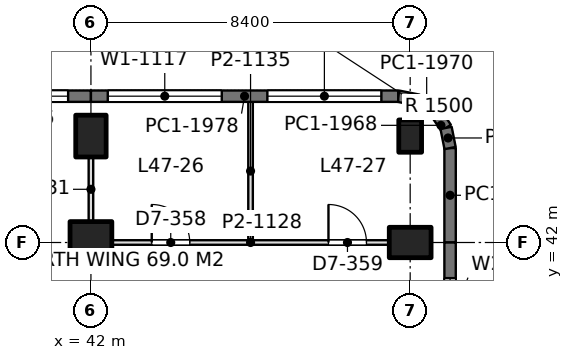
"""IFC4 building model, lengths in metres.
Left out: names, types, materials, properties, quantities, classifications, styles, units other than length and angle.
Written with IfcOpenShell. Run it as: python <this file> out.ifc"""

import sys

from ifc_helpers import new_model, si_unit, direction, frame, frame_2d, origin, origin_2d, place, context, subcontext, project, spatial, rectangle, extrude, element, fill, save


model = new_model("IFC4")
c1 = context("Model", 3, precision=1e-05, world=origin(), true_north=direction((0.0, 1.0)))
c2 = subcontext(c1, "Body", "Model", "MODEL_VIEW")
j1 = project(units=[si_unit("LENGTHUNIT", "METRE"), si_unit("PLANEANGLEUNIT", "RADIAN")], contexts=[c1])
p1 = place(None, origin())
s1 = spatial("IfcSite", under=j1, at=p1, CompositionType="ELEMENT")
p2 = place(p1, origin())
s2 = spatial("IfcBuilding", under=s1, at=p2, CompositionType="ELEMENT")
p3 = place(p2, frame((0.0, 0.0, 207.0)))
s3 = spatial("IfcBuildingStorey", under=s2, at=p3, CompositionType="ELEMENT", Elevation=207.0)
p4 = place(p3, frame((42.0, 42.0, 0.0), z_axis=(0.0, 0.0, 1.0), x_axis=(1.0, 0.0, 0.0)))
e1 = element("IfcColumn", 1, at=p4, inside=s3, PredefinedType="COLUMN", context=c2, shape_type="SweptSolid", body=[
    extrude(rectangle(XDim=1.1, YDim=1.1, at=origin_2d()), origin(), (0.0, 0.0, 1.0), 4.2),
])
for number, where, z_axis, x_axis in (
    (2, (42.0, 44.8, 0.0), (0.0, 0.0, 1.0), (1.0, 0.0, 0.0)),
    (3, (50.4, 42.0, 0.0), (0.0, 0.0, 1.0), (0.0, 1.0, 0.0)),
):
    element("IfcColumn", number, at=place(p3, frame(where, z_axis=z_axis, x_axis=x_axis)), inside=s3, PredefinedType="COLUMN", context=c2, shape_type="SweptSolid", body=[
        extrude(rectangle(XDim=0.8, YDim=1.1, at=origin_2d()), origin(), (0.0, 0.0, 1.0), 4.2),
    ])
p5 = place(p3, frame((50.4, 44.8, 0.0), z_axis=(0.0, 0.0, 1.0), x_axis=(1.0, 0.0, 0.0)))
e4 = element("IfcColumn", 4, at=p5, inside=s3, PredefinedType="COLUMN", context=c2, shape_type="SweptSolid", body=[
    extrude(rectangle(XDim=0.6, YDim=0.85, at=origin_2d()), origin(), (0.0, 0.0, 1.0), 4.2),
])
p6 = place(p3, frame((33.6, 45.85, 0.0), z_axis=(0.0, 0.0, 1.0), x_axis=(1.0, 0.0, 0.0)))
e5 = element("IfcWall", 5, at=p6, inside=s3, PredefinedType="SOLIDWALL", context=c2, shape_type="SweptSolid", body=[
    extrude(rectangle(XDim=8.4, YDim=0.3, at=frame_2d((4.2, 0.0))), origin(), (0.0, 0.0, 1.0), 4.05),
])
p7 = place(p6, frame((0.6, 0.0, 0.9)))
e6 = element("IfcOpeningElement", 6, at=p7, cuts=e5, PredefinedType="OPENING", context=c2, shape_type="SweptSolid", body=[
    extrude(rectangle(XDim=3.0, YDim=1.9, at=frame_2d((1.5, 0.95))), frame((0.0, 0.16, 0.0), z_axis=(0.0, -1.0, 0.0), x_axis=(1.0, 0.0, 0.0)), (0.0, 0.0, 1.0), 0.32),
])
p8 = place(p6, frame((4.8, 0.0, 0.9)))
e7 = element("IfcOpeningElement", 7, at=p8, cuts=e5, PredefinedType="OPENING", context=c2, shape_type="SweptSolid", body=[
    extrude(rectangle(XDim=3.0, YDim=1.9, at=frame_2d((1.5, 0.95))), frame((0.0, 0.16, 0.0), z_axis=(0.0, -1.0, 0.0), x_axis=(1.0, 0.0, 0.0)), (0.0, 0.0, 1.0), 0.32),
])
p9 = place(p3, frame((42.0, 45.85, 0.0), z_axis=(0.0, 0.0, 1.0), x_axis=(1.0, 0.0, 0.0)))
e8 = element("IfcWall", 8, at=p9, inside=s3, PredefinedType="SOLIDWALL", context=c2, shape_type="SweptSolid", body=[
    extrude(rectangle(XDim=8.085, YDim=0.3, at=frame_2d((4.042, 0.0))), origin(), (0.0, 0.0, 1.0), 4.05),
])
p10 = place(p9, frame((0.443, 0.0, 0.9)))
e9 = element("IfcOpeningElement", 9, at=p10, cuts=e8, PredefinedType="OPENING", context=c2, shape_type="SweptSolid", body=[
    extrude(rectangle(XDim=3.0, YDim=1.9, at=frame_2d((1.5, 0.95))), frame((0.0, 0.16, 0.0), z_axis=(0.0, -1.0, 0.0), x_axis=(1.0, 0.0, 0.0)), (0.0, 0.0, 1.0), 0.32),
])
p11 = place(p9, frame((4.643, 0.0, 0.9)))
e10 = element("IfcOpeningElement", 10, at=p11, cuts=e8, PredefinedType="OPENING", context=c2, shape_type="SweptSolid", body=[
    extrude(rectangle(XDim=3.0, YDim=1.9, at=frame_2d((1.5, 0.95))), frame((0.0, 0.16, 0.0), z_axis=(0.0, -1.0, 0.0), x_axis=(1.0, 0.0, 0.0)), (0.0, 0.0, 1.0), 0.32),
])
p12 = place(p3, frame((50.085, 45.85, 0.0), z_axis=(0.0, 0.0, 1.0), x_axis=(0.980702050465, -0.1955082817, 0.0)))
e11 = element("IfcWall", 11, at=p12, inside=s3, PredefinedType="SOLIDWALL", context=c2, shape_type="SweptSolid", body=[
    extrude(rectangle(XDim=0.541, YDim=0.3, at=frame_2d((0.271, 0.0))), origin(), (0.0, 0.0, 1.0), 4.05),
])
p13 = place(p3, frame((50.615, 45.744, 0.0), z_axis=(0.0, 0.0, 1.0), x_axis=(0.831692711774, -0.555236195849, 0.0)))
e12 = element("IfcWall", 12, at=p13, inside=s3, PredefinedType="SOLIDWALL", context=c2, shape_type="SweptSolid", body=[
    extrude(rectangle(XDim=0.525, YDim=0.3, at=frame_2d((0.263, 0.0))), origin(), (0.0, 0.0, 1.0), 4.05),
])
p14 = place(p3, frame((51.052, 45.453, 0.0), z_axis=(0.0, 0.0, 1.0), x_axis=(0.55534295404, -0.831621430339, 0.0)))
e13 = element("IfcWall", 13, at=p14, inside=s3, PredefinedType="SOLIDWALL", context=c2, shape_type="SweptSolid", body=[
    extrude(rectangle(XDim=0.526, YDim=0.3, at=frame_2d((0.263, 0.0))), origin(), (0.0, 0.0, 1.0), 4.05),
])
p15 = place(p3, frame((51.344, 45.015, 0.0), z_axis=(0.0, 0.0, 1.0), x_axis=(0.195073962632, -0.980788534345, 0.0)))
e14 = element("IfcWall", 14, at=p15, inside=s3, PredefinedType="SOLIDWALL", context=c2, shape_type="SweptSolid", body=[
    extrude(rectangle(XDim=0.541, YDim=0.3, at=frame_2d((0.271, 0.0))), origin(), (0.0, 0.0, 1.0), 4.05),
])
p16 = place(p3, frame((51.45, 44.485, 0.0), z_axis=(0.0, 0.0, 1.0), x_axis=(0.0, -1.0, 0.0)))
e15 = element("IfcWall", 15, at=p16, inside=s3, PredefinedType="SOLIDWALL", context=c2, shape_type="SweptSolid", body=[
    extrude(rectangle(XDim=2.485, YDim=0.3, at=frame_2d((1.243, 0.0))), origin(), (0.0, 0.0, 1.0), 4.05),
])
p17 = place(p3, frame((51.45, 42.0, 0.0), z_axis=(0.0, 0.0, 1.0), x_axis=(0.0, -1.0, 0.0)))
e16 = element("IfcWall", 16, at=p17, inside=s3, PredefinedType="SOLIDWALL", context=c2, shape_type="SweptSolid", body=[
    extrude(rectangle(XDim=4.275, YDim=0.3, at=frame_2d((2.137, 0.0))), origin(), (0.0, 0.0, 1.0), 4.05),
])
p18 = place(p17, frame((0.938, 0.0, 0.9)))
e17 = element("IfcOpeningElement", 17, at=p18, cuts=e16, PredefinedType="OPENING", context=c2, shape_type="SweptSolid", body=[
    extrude(rectangle(XDim=2.4, YDim=1.9, at=frame_2d((1.2, 0.95))), frame((0.0, 0.16, 0.0), z_axis=(0.0, -1.0, 0.0), x_axis=(1.0, 0.0, 0.0)), (0.0, 0.0, 1.0), 0.32),
])
p19 = place(p3, frame((42.549, 42.0, 0.0), z_axis=(0.0, 0.0, 1.0), x_axis=(1.0, 0.0, 0.0)))
e18 = element("IfcWall", 18, at=p19, inside=s3, PredefinedType="PARTITIONING", context=c2, shape_type="SweptSolid", body=[
    extrude(rectangle(XDim=7.302, YDim=0.12, at=frame_2d((3.651, 0.0))), origin(), (0.0, 0.0, 1.0), 3.55),
])
p20 = place(p19, frame((1.051, 0.0, 0.0)))
e19 = element("IfcOpeningElement", 19, at=p20, cuts=e18, PredefinedType="OPENING", context=c2, shape_type="SweptSolid", body=[
    extrude(rectangle(XDim=1.0, YDim=2.4, at=frame_2d((0.5, 1.2))), frame((0.0, 0.07, 0.0), z_axis=(0.0, -1.0, 0.0), x_axis=(1.0, 0.0, 0.0)), (0.0, 0.0, 1.0), 0.14),
])
p21 = place(p19, frame((5.701, 0.0, 0.0)))
e20 = element("IfcOpeningElement", 20, at=p21, cuts=e18, PredefinedType="OPENING", context=c2, shape_type="SweptSolid", body=[
    extrude(rectangle(XDim=1.0, YDim=2.4, at=frame_2d((0.5, 1.2))), frame((0.0, 0.07, 0.0), z_axis=(0.0, -1.0, 0.0), x_axis=(1.0, 0.0, 0.0)), (0.0, 0.0, 1.0), 0.14),
])
p22 = place(p3, frame((42.0, 42.549, 0.0), z_axis=(0.0, 0.0, 1.0), x_axis=(0.0, 1.0, 0.0)))
e21 = element("IfcWall", 21, at=p22, inside=s3, PredefinedType="PARTITIONING", context=c2, shape_type="SweptSolid", body=[
    extrude(rectangle(XDim=1.702, YDim=0.12, at=frame_2d((0.851, 0.0))), origin(), (0.0, 0.0, 1.0), 3.69),
])
p23 = place(p3, frame((46.2, 42.058, 0.0), z_axis=(0.0, 0.0, 1.0), x_axis=(0.0, 1.0, 0.0)))
e22 = element("IfcWall", 22, at=p23, inside=s3, PredefinedType="PARTITIONING", context=c2, shape_type="SweptSolid", body=[
    extrude(rectangle(XDim=3.644, YDim=0.12, at=frame_2d((1.822, 0.0))), origin(), (0.0, 0.0, 1.0), 3.55),
])
p24 = place(p8, origin())
e23 = element("IfcWindow", 23, at=p24, inside=s3, PartitioningType="SINGLE_PANEL", PredefinedType="WINDOW", context=c2, shape_type="SweptSolid", body=[
    extrude(rectangle(XDim=3.0, YDim=1.9, at=frame_2d((1.5, 0.95))), frame((0.0, 0.03, 0.0), z_axis=(0.0, -1.0, 0.0), x_axis=(1.0, 0.0, 0.0)), (0.0, 0.0, 1.0), 0.06),
])
fill(e7, e23)
p25 = place(p10, origin())
e24 = element("IfcWindow", 24, at=p25, inside=s3, PartitioningType="SINGLE_PANEL", PredefinedType="WINDOW", context=c2, shape_type="SweptSolid", body=[
    extrude(rectangle(XDim=3.0, YDim=1.9, at=frame_2d((1.5, 0.95))), frame((0.0, 0.03, 0.0), z_axis=(0.0, -1.0, 0.0), x_axis=(1.0, 0.0, 0.0)), (0.0, 0.0, 1.0), 0.06),
])
fill(e9, e24)
p26 = place(p11, origin())
e25 = element("IfcWindow", 25, at=p26, inside=s3, PartitioningType="SINGLE_PANEL", PredefinedType="WINDOW", context=c2, shape_type="SweptSolid", body=[
    extrude(rectangle(XDim=3.0, YDim=1.9, at=frame_2d((1.5, 0.95))), frame((0.0, 0.03, 0.0), z_axis=(0.0, -1.0, 0.0), x_axis=(1.0, 0.0, 0.0)), (0.0, 0.0, 1.0), 0.06),
])
fill(e10, e25)
p27 = place(p18, origin())
e26 = element("IfcWindow", 26, at=p27, inside=s3, PartitioningType="SINGLE_PANEL", PredefinedType="WINDOW", context=c2, shape_type="SweptSolid", body=[
    extrude(rectangle(XDim=2.4, YDim=1.9, at=frame_2d((1.2, 0.95))), frame((0.0, 0.03, 0.0), z_axis=(0.0, -1.0, 0.0), x_axis=(1.0, 0.0, 0.0)), (0.0, 0.0, 1.0), 0.06),
])
fill(e17, e26)
p28 = place(p20, origin())
e27 = element("IfcDoor", 27, at=p28, inside=s3, OperationType="SINGLE_SWING_LEFT", PredefinedType="DOOR", context=c2, shape_type="SweptSolid", body=[
    extrude(rectangle(XDim=1.0, YDim=2.4, at=frame_2d((0.5, 1.2))), frame((0.0, 0.025, 0.0), z_axis=(0.0, -1.0, 0.0), x_axis=(1.0, 0.0, 0.0)), (0.0, 0.0, 1.0), 0.05),
])
fill(e19, e27)
p29 = place(p21, origin())
e28 = element("IfcDoor", 28, at=p29, inside=s3, OperationType="SINGLE_SWING_LEFT", PredefinedType="DOOR", context=c2, shape_type="SweptSolid", body=[
    extrude(rectangle(XDim=1.0, YDim=2.4, at=frame_2d((0.5, 1.2))), frame((0.0, 0.025, 0.0), z_axis=(0.0, -1.0, 0.0), x_axis=(1.0, 0.0, 0.0)), (0.0, 0.0, 1.0), 0.05),
])
fill(e20, e28)
save(model, sys.argv[1])
